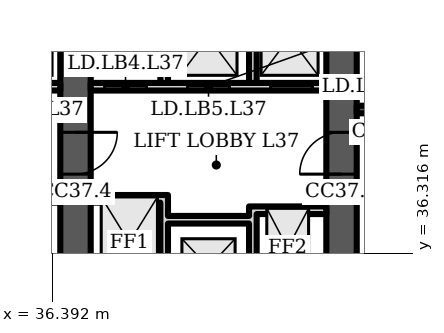
"""IFC4 building model, lengths in metres.
Left out: names, types, materials, properties, quantities, classifications, styles, units other than length and angle.
Written with IfcOpenShell. Run it as: python <this file> out.ifc"""

import sys

from ifc_helpers import new_model, si_unit, direction, frame, frame_2d, origin, place, context, subcontext, project, spatial, polyline, rectangle, outline, extrude, element, fill, save


model = new_model("IFC4")
c1 = context("Model", 3, precision=1e-05, world=origin(), true_north=direction((0.0, 1.0)))
c2 = subcontext(c1, "Body", "Model", "MODEL_VIEW")
j1 = project(units=[si_unit("LENGTHUNIT", "METRE"), si_unit("PLANEANGLEUNIT", "RADIAN")], contexts=[c1])
p1 = place(None, origin())
s1 = spatial("IfcSite", under=j1, at=p1, CompositionType="ELEMENT")
p2 = place(p1, origin())
s2 = spatial("IfcBuilding", under=s1, at=p2, CompositionType="ELEMENT")
p3 = place(p2, frame((0.0, 0.0, 155.5)))
s3 = spatial("IfcBuildingStorey", under=s2, at=p3, CompositionType="ELEMENT", Elevation=155.5)
p4 = place(p3, frame((37.0, 34.8, 0.0), z_axis=(0.0, 0.0, 1.0), x_axis=(0.0, 1.0, 0.0)))
e1 = element("IfcWall", 1, at=p4, inside=s3, PredefinedType="SHEAR", context=c2, shape_type="SweptSolid", body=[
    extrude(rectangle(XDim=14.987, YDim=0.8, at=frame_2d((7.493, 0.0))), origin(), (0.0, 0.0, 1.0), 3.6),
])
p5 = place(p4, frame((11.312, 0.0, 0.0)))
e2 = element("IfcOpeningElement", 2, at=p5, cuts=e1, PredefinedType="OPENING", context=c2, shape_type="SweptSolid", body=[
    extrude(rectangle(XDim=1.0, YDim=2.1, at=frame_2d((0.5, 1.05))), frame((0.0, 0.41, 0.0), z_axis=(0.0, -1.0, 0.0), x_axis=(1.0, 0.0, 0.0)), (0.0, 0.0, 1.0), 0.82),
])
p6 = place(p4, frame((3.6, 0.0, 0.0)))
e3 = element("IfcOpeningElement", 3, at=p6, cuts=e1, PredefinedType="OPENING", context=c2, shape_type="SweptSolid", body=[
    extrude(rectangle(XDim=1.1, YDim=2.1, at=frame_2d((0.55, 1.05))), frame((0.0, 0.41, 0.0), z_axis=(0.0, -1.0, 0.0), x_axis=(1.0, 0.0, 0.0)), (0.0, 0.0, 1.0), 0.82),
])
p7 = place(p3, frame((44.0, 34.8, 0.0), z_axis=(0.0, 0.0, 1.0), x_axis=(0.0, 1.0, 0.0)))
e4 = element("IfcWall", 4, at=p7, inside=s3, PredefinedType="SHEAR", context=c2, shape_type="SweptSolid", body=[
    extrude(rectangle(XDim=14.374, YDim=0.8, at=frame_2d((7.187, 0.0))), origin(), (0.0, 0.0, 1.0), 3.6),
])
p8 = place(p7, frame((11.312, 0.0, 0.0)))
e5 = element("IfcOpeningElement", 5, at=p8, cuts=e4, PredefinedType="OPENING", context=c2, shape_type="SweptSolid", body=[
    extrude(rectangle(XDim=1.0, YDim=2.1, at=frame_2d((0.5, 1.05))), frame((0.0, 0.41, 0.0), z_axis=(0.0, -1.0, 0.0), x_axis=(1.0, 0.0, 0.0)), (0.0, 0.0, 1.0), 0.82),
])
p9 = place(p7, frame((3.6, 0.0, 0.0)))
e6 = element("IfcOpeningElement", 6, at=p9, cuts=e4, PredefinedType="OPENING", context=c2, shape_type="SweptSolid", body=[
    extrude(rectangle(XDim=1.1, YDim=2.1, at=frame_2d((0.55, 1.05))), frame((0.0, 0.41, 0.0), z_axis=(0.0, -1.0, 0.0), x_axis=(1.0, 0.0, 0.0)), (0.0, 0.0, 1.0), 0.82),
])
p10 = place(p3, frame((30.4, 40.7, 0.0), z_axis=(0.0, 0.0, 1.0), x_axis=(1.0, 0.0, 0.0)))
e7 = element("IfcWall", 7, at=p10, inside=s3, PredefinedType="PARTITIONING", context=c2, shape_type="SweptSolid", body=[
    extrude(rectangle(XDim=6.2, YDim=0.2, at=frame_2d((3.1, 0.0))), origin(), (0.0, 0.0, 1.0), 3.2),
])
p11 = place(p10, frame((0.367, 0.0, 0.0)))
e8 = element("IfcOpeningElement", 8, at=p11, cuts=e7, PredefinedType="OPENING", context=c2, shape_type="SweptSolid", body=[
    extrude(rectangle(XDim=1.1, YDim=2.1, at=frame_2d((0.55, 1.05))), frame((0.0, 0.11, 0.0), z_axis=(0.0, -1.0, 0.0), x_axis=(1.0, 0.0, 0.0)), (0.0, 0.0, 1.0), 0.22),
])
p12 = place(p10, frame((2.55, 0.0, 0.0)))
e9 = element("IfcOpeningElement", 9, at=p12, cuts=e7, PredefinedType="OPENING", context=c2, shape_type="SweptSolid", body=[
    extrude(rectangle(XDim=1.1, YDim=2.1, at=frame_2d((0.55, 1.05))), frame((0.0, 0.11, 0.0), z_axis=(0.0, -1.0, 0.0), x_axis=(1.0, 0.0, 0.0)), (0.0, 0.0, 1.0), 0.22),
])
p13 = place(p10, frame((4.733, 0.0, 0.0)))
e10 = element("IfcOpeningElement", 10, at=p13, cuts=e7, PredefinedType="OPENING", context=c2, shape_type="SweptSolid", body=[
    extrude(rectangle(XDim=1.1, YDim=2.1, at=frame_2d((0.55, 1.05))), frame((0.0, 0.11, 0.0), z_axis=(0.0, -1.0, 0.0), x_axis=(1.0, 0.0, 0.0)), (0.0, 0.0, 1.0), 0.22),
])
p14 = place(p3, frame((0.0, 0.0, -0.0)))
e11 = element("IfcWall", 11, at=p14, inside=s3, PredefinedType="PARTITIONING", context=c2, shape_type="SweptSolid", body=[
    extrude(outline(polyline([(34.567, 37.85), (34.767, 37.85), (36.6, 37.85), (36.6, 37.65), (34.767, 37.65), (34.767, 34.8), (34.567, 34.8), (34.567, 37.85)])), origin(), (0.0, 0.0, 1.0), 3.2),
])
p15 = place(p3, frame((0.0, 0.0, -0.0)))
e12 = element("IfcWall", 12, at=p15, inside=s3, PredefinedType="PARTITIONING", context=c2, shape_type="SweptSolid", body=[
    extrude(outline(polyline([(32.433, 40.8), (32.233, 40.8), (32.233, 43.8), (30.4, 43.8), (30.4, 44.0), (36.6, 44.0), (36.6, 43.8), (34.767, 43.8), (34.767, 40.8), (34.567, 40.8), (34.567, 43.8), (32.433, 43.8), (32.433, 40.8)])), origin(), (0.0, 0.0, 1.0), 3.2),
])
p16 = place(p3, frame((37.4, 40.7, 0.0), z_axis=(0.0, 0.0, 1.0), x_axis=(1.0, 0.0, 0.0)))
e13 = element("IfcWall", 13, at=p16, inside=s3, PredefinedType="PARTITIONING", context=c2, shape_type="SweptSolid", body=[
    extrude(rectangle(XDim=6.2, YDim=0.2, at=frame_2d((3.1, 0.0))), origin(), (0.0, 0.0, 1.0), 3.2),
])
p17 = place(p16, frame((0.367, 0.0, 0.0)))
e14 = element("IfcOpeningElement", 14, at=p17, cuts=e13, PredefinedType="OPENING", context=c2, shape_type="SweptSolid", body=[
    extrude(rectangle(XDim=1.1, YDim=2.1, at=frame_2d((0.55, 1.05))), frame((0.0, 0.11, 0.0), z_axis=(0.0, -1.0, 0.0), x_axis=(1.0, 0.0, 0.0)), (0.0, 0.0, 1.0), 0.22),
])
p18 = place(p16, frame((2.55, 0.0, 0.0)))
e15 = element("IfcOpeningElement", 15, at=p18, cuts=e13, PredefinedType="OPENING", context=c2, shape_type="SweptSolid", body=[
    extrude(rectangle(XDim=1.1, YDim=2.1, at=frame_2d((0.55, 1.05))), frame((0.0, 0.11, 0.0), z_axis=(0.0, -1.0, 0.0), x_axis=(1.0, 0.0, 0.0)), (0.0, 0.0, 1.0), 0.22),
])
p19 = place(p16, frame((4.733, 0.0, 0.0)))
e16 = element("IfcOpeningElement", 16, at=p19, cuts=e13, PredefinedType="OPENING", context=c2, shape_type="SweptSolid", body=[
    extrude(rectangle(XDim=1.1, YDim=2.1, at=frame_2d((0.55, 1.05))), frame((0.0, 0.11, 0.0), z_axis=(0.0, -1.0, 0.0), x_axis=(1.0, 0.0, 0.0)), (0.0, 0.0, 1.0), 0.22),
])
p20 = place(p3, frame((0.0, 0.0, -0.0)))
e17 = element("IfcWall", 17, at=p20, inside=s3, PredefinedType="PARTITIONING", context=c2, shape_type="SweptSolid", body=[
    extrude(outline(polyline([(41.567, 37.1), (39.433, 37.1), (39.433, 34.8), (39.233, 34.8), (39.233, 37.65), (37.4, 37.65), (37.4, 37.85), (39.233, 37.85), (39.433, 37.85), (39.433, 37.3), (41.567, 37.3), (41.567, 37.55), (41.767, 37.55), (43.6, 37.55), (43.6, 37.35), (41.767, 37.35), (41.767, 34.8), (41.567, 34.8), (41.567, 37.1)])), origin(), (0.0, 0.0, 1.0), 3.2),
])
p21 = place(p3, frame((0.0, 0.0, -0.0)))
e18 = element("IfcWall", 18, at=p21, inside=s3, PredefinedType="PARTITIONING", context=c2, shape_type="SweptSolid", body=[
    extrude(outline(polyline([(39.433, 40.8), (39.233, 40.8), (39.233, 43.8), (37.4, 43.8), (37.4, 44.0), (43.6, 44.0), (43.6, 43.8), (41.767, 43.8), (41.767, 40.8), (41.567, 40.8), (41.567, 43.8), (39.433, 43.8), (39.433, 40.8)])), origin(), (0.0, 0.0, 1.0), 3.2),
])
p22 = place(p3, frame((44.4, 40.1, 0.0), z_axis=(0.0, 0.0, 1.0), x_axis=(1.0, 0.0, 0.0)))
e19 = element("IfcWall", 19, at=p22, inside=s3, PredefinedType="SHEAR", context=c2, shape_type="SweptSolid", body=[
    extrude(rectangle(XDim=6.2, YDim=0.2, at=frame_2d((3.1, 0.0))), origin(), (0.0, 0.0, 1.0), 3.2),
])
p23 = place(p22, frame((3.525, 0.0, 0.0)))
e20 = element("IfcOpeningElement", 20, at=p23, cuts=e19, PredefinedType="OPENING", context=c2, shape_type="SweptSolid", body=[
    extrude(rectangle(XDim=1.2, YDim=2.1, at=frame_2d((0.6, 1.05))), frame((0.0, 0.11, 0.0), z_axis=(0.0, -1.0, 0.0), x_axis=(1.0, 0.0, 0.0)), (0.0, 0.0, 1.0), 0.22),
])
p24 = place(p22, frame((0.575, 0.0, 0.0)))
e21 = element("IfcOpeningElement", 21, at=p24, cuts=e19, PredefinedType="OPENING", context=c2, shape_type="SweptSolid", body=[
    extrude(rectangle(XDim=0.9, YDim=2.1, at=frame_2d((0.45, 1.05))), frame((0.0, 0.11, 0.0), z_axis=(0.0, -1.0, 0.0), x_axis=(1.0, 0.0, 0.0)), (0.0, 0.0, 1.0), 0.22),
])
p25 = place(p17, origin())
e22 = element("IfcDoor", 22, at=p25, inside=s3, OperationType="DOUBLE_DOOR_SLIDING", PredefinedType="DOOR", context=c2, shape_type="SweptSolid", body=[
    extrude(rectangle(XDim=1.1, YDim=2.1, at=frame_2d((0.55, 1.05))), frame((0.0, 0.025, 0.0), z_axis=(0.0, -1.0, 0.0), x_axis=(1.0, 0.0, 0.0)), (0.0, 0.0, 1.0), 0.05),
])
fill(e14, e22)
p26 = place(p18, origin())
e23 = element("IfcDoor", 23, at=p26, inside=s3, OperationType="DOUBLE_DOOR_SLIDING", PredefinedType="DOOR", context=c2, shape_type="SweptSolid", body=[
    extrude(rectangle(XDim=1.1, YDim=2.1, at=frame_2d((0.55, 1.05))), frame((0.0, 0.025, 0.0), z_axis=(0.0, -1.0, 0.0), x_axis=(1.0, 0.0, 0.0)), (0.0, 0.0, 1.0), 0.05),
])
fill(e15, e23)
p27 = place(p19, origin())
e24 = element("IfcDoor", 24, at=p27, inside=s3, OperationType="DOUBLE_DOOR_SLIDING", PredefinedType="DOOR", context=c2, shape_type="SweptSolid", body=[
    extrude(rectangle(XDim=1.1, YDim=2.1, at=frame_2d((0.55, 1.05))), frame((0.0, 0.025, 0.0), z_axis=(0.0, -1.0, 0.0), x_axis=(1.0, 0.0, 0.0)), (0.0, 0.0, 1.0), 0.05),
])
fill(e16, e24)
p28 = place(p6, origin())
e25 = element("IfcDoor", 25, at=p28, inside=s3, OperationType="SINGLE_SWING_RIGHT", PredefinedType="DOOR", context=c2, shape_type="SweptSolid", body=[
    extrude(rectangle(XDim=1.1, YDim=2.1, at=frame_2d((0.55, 1.05))), frame((0.0, 0.025, 0.0), z_axis=(0.0, -1.0, 0.0), x_axis=(1.0, 0.0, 0.0)), (0.0, 0.0, 1.0), 0.05),
])
fill(e3, e25)
p29 = place(p9, origin())
e26 = element("IfcDoor", 26, at=p29, inside=s3, OperationType="SINGLE_SWING_LEFT", PredefinedType="DOOR", context=c2, shape_type="SweptSolid", body=[
    extrude(rectangle(XDim=1.1, YDim=2.1, at=frame_2d((0.55, 1.05))), frame((0.0, 0.025, 0.0), z_axis=(0.0, -1.0, 0.0), x_axis=(1.0, 0.0, 0.0)), (0.0, 0.0, 1.0), 0.05),
])
fill(e6, e26)
save(model, sys.argv[1])
